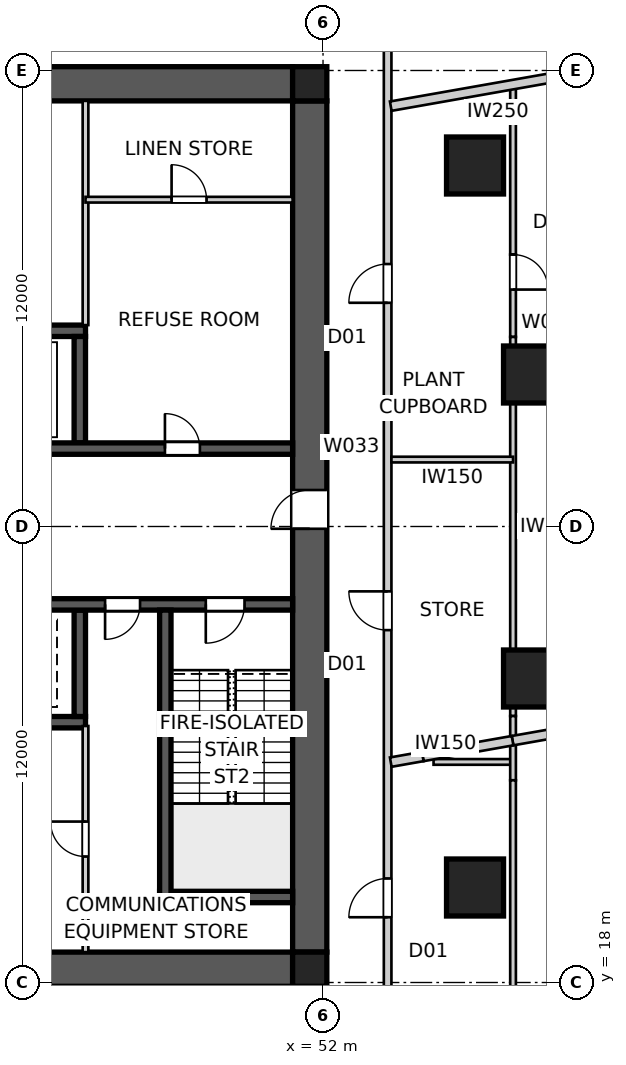
"""IFC4 building model, lengths in metres.
Left out: names, types, materials, properties, quantities, classifications, styles, units other than length and angle.
Written with IfcOpenShell. Run it as: python <this file> out.ifc"""

import sys

from ifc_helpers import new_model, si_unit, direction, frame, frame_2d, origin, origin_2d, place, context, subcontext, project, spatial, polyline, rectangle, outline, extrude, element, fill, save


model = new_model("IFC4")
c1 = context("Model", 3, precision=1e-05, world=origin(), true_north=direction((0.0, 1.0)))
c2 = subcontext(c1, "Body", "Model", "MODEL_VIEW")
j1 = project(units=[si_unit("LENGTHUNIT", "METRE"), si_unit("PLANEANGLEUNIT", "RADIAN")], contexts=[c1])
p1 = place(None, origin())
s1 = spatial("IfcSite", under=j1, at=p1, CompositionType="ELEMENT")
p2 = place(p1, origin())
s2 = spatial("IfcBuilding", under=s1, at=p2, CompositionType="ELEMENT")
p3 = place(p2, frame((0.0, 0.0, 74.4)))
s3 = spatial("IfcBuildingStorey", under=s2, at=p3, CompositionType="ELEMENT", Elevation=74.4)
for number, where, z_axis, x_axis in (
    (1, (28.8, 41.65, 0.0), (0.0, 0.0, 1.0), (1.0, 0.0, 0.0)),
    (2, (51.2, 18.35, 0.0), (0.0, 0.0, 1.0), (-1.0, 0.0, 0.0)),
):
    element("IfcWall", number, at=place(p3, frame(where, z_axis=z_axis, x_axis=x_axis)), inside=s3, PredefinedType="SHEAR", context=c2, shape_type="SweptSolid", body=[
        extrude(outline(polyline([(0.0, -0.45), (22.4, -0.45), (22.4, -0.025), (22.85, -0.025), (22.85, 0.025), (22.4, 0.025), (22.4, 0.45), (0.0, 0.45), (0.0, 0.025), (-0.45, 0.025), (-0.45, -0.025), (0.0, -0.025), (0.0, -0.45)])), origin(), (0.0, 0.0, 1.0), 5.0),
    ])
p4 = place(p3, frame((51.65, 18.8, 0.0), z_axis=(0.0, 0.0, 1.0), x_axis=(0.0, 1.0, 0.0)))
e3 = element("IfcWall", 3, at=p4, inside=s3, PredefinedType="SHEAR", context=c2, shape_type="SweptSolid", body=[
    extrude(outline(polyline([(0.0, -0.45), (22.4, -0.45), (22.4, -0.025), (22.85, -0.025), (22.85, 0.025), (22.4, 0.025), (22.4, 0.45), (0.0, 0.45), (0.0, 0.025), (-0.45, 0.025), (-0.45, -0.025), (0.0, -0.025), (0.0, -0.45)])), origin(), (0.0, 0.0, 1.0), 5.0),
])
p5 = place(p4, frame((11.14, 0.0, 0.0)))
e4 = element("IfcOpeningElement", 4, at=p5, cuts=e3, PredefinedType="OPENING", context=c2, shape_type="SweptSolid", body=[
    extrude(rectangle(XDim=1.02, YDim=2.4, at=frame_2d((0.51, 1.2))), frame((0.0, 0.46, 0.0), z_axis=(0.0, -1.0, 0.0), x_axis=(1.0, 0.0, 0.0)), (0.0, 0.0, 1.0), 0.92),
])
p6 = place(p3, frame((28.8, 32.05, 0.0), z_axis=(0.0, 0.0, 1.0), x_axis=(1.0, 0.0, 0.0)))
e5 = element("IfcWall", 5, at=p6, inside=s3, PredefinedType="SHEAR", context=c2, shape_type="SweptSolid", body=[
    extrude(rectangle(XDim=22.4, YDim=0.3, at=frame_2d((11.2, 0.0))), origin(), (0.0, 0.0, 1.0), 5.0),
])
p7 = place(p6, frame((19.04, 0.0, 0.0)))
e6 = element("IfcOpeningElement", 6, at=p7, cuts=e5, PredefinedType="OPENING", context=c2, shape_type="SweptSolid", body=[
    extrude(rectangle(XDim=0.92, YDim=2.1, at=frame_2d((0.46, 1.05))), frame((0.0, 0.16, 0.0), z_axis=(0.0, -1.0, 0.0), x_axis=(1.0, 0.0, 0.0)), (0.0, 0.0, 1.0), 0.32),
])
p8 = place(p6, frame((1.265, 0.0, 0.0)))
e7 = element("IfcOpeningElement", 7, at=p8, cuts=e5, PredefinedType="OPENING", context=c2, shape_type="SweptSolid", body=[
    extrude(rectangle(XDim=1.02, YDim=2.1, at=frame_2d((0.51, 1.05))), frame((0.0, 0.16, 0.0), z_axis=(0.0, -1.0, 0.0), x_axis=(1.0, 0.0, 0.0)), (0.0, 0.0, 1.0), 0.32),
])
p9 = place(p6, frame((4.015, 0.0, 0.0)))
e8 = element("IfcOpeningElement", 8, at=p9, cuts=e5, PredefinedType="OPENING", context=c2, shape_type="SweptSolid", body=[
    extrude(rectangle(XDim=0.92, YDim=2.1, at=frame_2d((0.46, 1.05))), frame((0.0, 0.16, 0.0), z_axis=(0.0, -1.0, 0.0), x_axis=(1.0, 0.0, 0.0)), (0.0, 0.0, 1.0), 0.32),
])
p10 = place(p6, frame((6.45, 0.0, 0.0)))
e9 = element("IfcOpeningElement", 9, at=p10, cuts=e5, PredefinedType="OPENING", context=c2, shape_type="SweptSolid", body=[
    extrude(rectangle(XDim=1.1, YDim=2.1, at=frame_2d((0.55, 1.05))), frame((0.0, 0.16, 0.0), z_axis=(0.0, -1.0, 0.0), x_axis=(1.0, 0.0, 0.0)), (0.0, 0.0, 1.0), 0.32),
])
p11 = place(p6, frame((9.25, 0.0, 0.0)))
e10 = element("IfcOpeningElement", 10, at=p11, cuts=e5, PredefinedType="OPENING", context=c2, shape_type="SweptSolid", body=[
    extrude(rectangle(XDim=1.1, YDim=2.1, at=frame_2d((0.55, 1.05))), frame((0.0, 0.16, 0.0), z_axis=(0.0, -1.0, 0.0), x_axis=(1.0, 0.0, 0.0)), (0.0, 0.0, 1.0), 0.32),
])
p12 = place(p6, frame((14.85, 0.0, 0.0)))
e11 = element("IfcOpeningElement", 11, at=p12, cuts=e5, PredefinedType="OPENING", context=c2, shape_type="SweptSolid", body=[
    extrude(rectangle(XDim=1.1, YDim=2.1, at=frame_2d((0.55, 1.05))), frame((0.0, 0.16, 0.0), z_axis=(0.0, -1.0, 0.0), x_axis=(1.0, 0.0, 0.0)), (0.0, 0.0, 1.0), 0.32),
])
p13 = place(p3, frame((51.2, 27.95, 0.0), z_axis=(0.0, 0.0, 1.0), x_axis=(-1.0, 0.0, 0.0)))
e12 = element("IfcWall", 12, at=p13, inside=s3, PredefinedType="SHEAR", context=c2, shape_type="SweptSolid", body=[
    extrude(rectangle(XDim=22.4, YDim=0.3, at=frame_2d((11.2, 0.0))), origin(), (0.0, 0.0, 1.0), 5.0),
])
p14 = place(p13, frame((19.04, 0.0, 0.0)))
e13 = element("IfcOpeningElement", 13, at=p14, cuts=e12, PredefinedType="OPENING", context=c2, shape_type="SweptSolid", body=[
    extrude(rectangle(XDim=0.92, YDim=2.1, at=frame_2d((0.46, 1.05))), frame((0.0, 0.16, 0.0), z_axis=(0.0, -1.0, 0.0), x_axis=(1.0, 0.0, 0.0)), (0.0, 0.0, 1.0), 0.32),
])
p15 = place(p13, frame((1.265, 0.0, 0.0)))
e14 = element("IfcOpeningElement", 14, at=p15, cuts=e12, PredefinedType="OPENING", context=c2, shape_type="SweptSolid", body=[
    extrude(rectangle(XDim=1.02, YDim=2.1, at=frame_2d((0.51, 1.05))), frame((0.0, 0.16, 0.0), z_axis=(0.0, -1.0, 0.0), x_axis=(1.0, 0.0, 0.0)), (0.0, 0.0, 1.0), 0.32),
])
p16 = place(p13, frame((4.015, 0.0, 0.0)))
e15 = element("IfcOpeningElement", 15, at=p16, cuts=e12, PredefinedType="OPENING", context=c2, shape_type="SweptSolid", body=[
    extrude(rectangle(XDim=0.92, YDim=2.1, at=frame_2d((0.46, 1.05))), frame((0.0, 0.16, 0.0), z_axis=(0.0, -1.0, 0.0), x_axis=(1.0, 0.0, 0.0)), (0.0, 0.0, 1.0), 0.32),
])
p17 = place(p13, frame((14.85, 0.0, 0.0)))
e16 = element("IfcOpeningElement", 16, at=p17, cuts=e12, PredefinedType="OPENING", context=c2, shape_type="SweptSolid", body=[
    extrude(rectangle(XDim=1.1, YDim=2.1, at=frame_2d((0.55, 1.05))), frame((0.0, 0.16, 0.0), z_axis=(0.0, -1.0, 0.0), x_axis=(1.0, 0.0, 0.0)), (0.0, 0.0, 1.0), 0.32),
])
for number, where, z_axis, x_axis in (
    (17, (34.25, 35.15, 0.0), (0.0, 0.0, 1.0), (1.0, 0.0, 0.0)),
    (18, (45.75, 24.85, 0.0), (0.0, 0.0, 1.0), (-1.0, 0.0, 0.0)),
):
    element("IfcWall", number, at=place(p3, frame(where, z_axis=z_axis, x_axis=x_axis)), inside=s3, PredefinedType="SHEAR", context=c2, shape_type="SweptSolid", body=[
        extrude(rectangle(XDim=11.5, YDim=0.3, at=frame_2d((5.75, 0.0))), origin(), (0.0, 0.0, 1.0), 5.0),
    ])
for number, where, z_axis, x_axis in (
    (19, (45.6, 27.8, 0.0), (0.0, 0.0, 1.0), (0.0, -1.0, 0.0)),
    (20, (45.6, 32.2, 0.0), (0.0, 0.0, 1.0), (0.0, 1.0, 0.0)),
):
    element("IfcWall", number, at=place(p3, frame(where, z_axis=z_axis, x_axis=x_axis)), inside=s3, PredefinedType="SHEAR", context=c2, shape_type="SweptSolid", body=[
        extrude(rectangle(XDim=2.8, YDim=0.3, at=frame_2d((1.4, 0.0))), origin(), (0.0, 0.0, 1.0), 5.0),
    ])
p18 = place(p3, frame((47.85, 27.8, 0.0), z_axis=(0.0, 0.0, 1.0), x_axis=(0.0, -1.0, 0.0)))
e21 = element("IfcWall", 21, at=p18, inside=s3, PredefinedType="SHEAR", context=c2, shape_type="SweptSolid", body=[
    extrude(rectangle(XDim=7.7, YDim=0.3, at=frame_2d((3.85, 0.0))), origin(), (0.0, 0.0, 1.0), 5.0),
])
p19 = place(p3, frame((51.2, 20.25, 0.0), z_axis=(0.0, 0.0, 1.0), x_axis=(-1.0, 0.0, 0.0)))
e22 = element("IfcWall", 22, at=p19, inside=s3, PredefinedType="SHEAR", context=c2, shape_type="SweptSolid", body=[
    extrude(rectangle(XDim=3.5, YDim=0.3, at=frame_2d((1.75, 0.0))), origin(), (0.0, 0.0, 1.0), 5.0),
])
for number, where, z_axis, x_axis in (
    (23, (51.65, 18.35, 0.0), (0.0, 0.0, 1.0), (1.0, 0.0, 0.0)),
    (24, (51.65, 41.65, 0.0), (0.0, 0.0, 1.0), (1.0, 0.0, 0.0)),
):
    element("IfcColumn", number, at=place(p3, frame(where, z_axis=z_axis, x_axis=x_axis)), inside=s3, PredefinedType="COLUMN", context=c2, shape_type="SweptSolid", body=[
        extrude(rectangle(XDim=0.9, YDim=0.9, at=origin_2d()), origin(), (0.0, 0.0, 1.0), 5.0),
    ])
for number, where, z_axis, x_axis in (
    (25, (57.5, 26.0, 0.0), (0.0, 0.0, 1.0), (1.0, 0.0, 0.0)),
    (26, (57.5, 34.0, 0.0), (0.0, 0.0, 1.0), (1.0, 0.0, 0.0)),
    (27, (56.0, 39.5, 0.0), (0.0, 0.0, 1.0), (1.0, 0.0, 0.0)),
    (28, (56.0, 20.5, 0.0), (0.0, 0.0, 1.0), (1.0, 0.0, 0.0)),
):
    element("IfcColumn", number, at=place(p3, frame(where, z_axis=z_axis, x_axis=x_axis)), inside=s3, PredefinedType="COLUMN", context=c2, shape_type="SweptSolid", body=[
        extrude(rectangle(XDim=1.5, YDim=1.5, at=origin_2d()), origin(), (0.0, 0.0, 1.0), 5.0),
    ])
p20 = place(p3, frame((53.7, 16.3, 0.0), z_axis=(0.0, 0.0, 1.0), x_axis=(0.0, 1.0, 0.0)))
e29 = element("IfcWall", 29, at=p20, inside=s3, PredefinedType="PARTITIONING", context=c2, shape_type="SweptSolid", body=[
    extrude(rectangle(XDim=27.4, YDim=0.2, at=frame_2d((13.7, 0.0))), origin(), (0.0, 0.0, 1.0), 4.85),
])
p21 = place(p20, frame((19.587, 0.0, 0.0)))
e30 = element("IfcOpeningElement", 30, at=p21, cuts=e29, PredefinedType="OPENING", context=c2, shape_type="SweptSolid", body=[
    extrude(rectangle(XDim=1.02, YDim=2.34, at=frame_2d((0.51, 1.17))), frame((0.0, 0.11, 0.0), z_axis=(0.0, -1.0, 0.0), x_axis=(1.0, 0.0, 0.0)), (0.0, 0.0, 1.0), 0.22),
])
p22 = place(p20, frame((10.973, 0.0, 0.0)))
e31 = element("IfcOpeningElement", 31, at=p22, cuts=e29, PredefinedType="OPENING", context=c2, shape_type="SweptSolid", body=[
    extrude(rectangle(XDim=1.02, YDim=2.34, at=frame_2d((0.51, 1.17))), frame((0.0, 0.11, 0.0), z_axis=(0.0, -1.0, 0.0), x_axis=(1.0, 0.0, 0.0)), (0.0, 0.0, 1.0), 0.22),
])
p23 = place(p20, frame((3.417, 0.0, 0.0)))
e32 = element("IfcOpeningElement", 32, at=p23, cuts=e29, PredefinedType="OPENING", context=c2, shape_type="SweptSolid", body=[
    extrude(rectangle(XDim=1.02, YDim=2.34, at=frame_2d((0.51, 1.17))), frame((0.0, 0.11, 0.0), z_axis=(0.0, -1.0, 0.0), x_axis=(1.0, 0.0, 0.0)), (0.0, 0.0, 1.0), 0.22),
])
p24 = place(p3, frame((62.157, 25.276, 0.0), z_axis=(0.0, 0.0, 1.0), x_axis=(-0.984813509266, -0.173615529166, 0.0)))
e33 = element("IfcWall", 33, at=p24, inside=s3, PredefinedType="PARTITIONING", context=c2, shape_type="SweptSolid", body=[
    extrude(rectangle(XDim=5.25, YDim=0.25, at=frame_2d((2.625, 0.0))), origin(), (0.0, 0.0, 1.0), 4.85),
])
p25 = place(p3, frame((56.987, 24.364, 0.0), z_axis=(0.0, 0.0, 1.0), x_axis=(-0.984811193906, -0.17362866226, 0.0)))
e34 = element("IfcWall", 34, at=p25, inside=s3, PredefinedType="PARTITIONING", context=c2, shape_type="SweptSolid", body=[
    extrude(rectangle(XDim=2.4, YDim=0.25, at=frame_2d((1.2, 0.0))), origin(), (0.0, 0.0, 1.0), 4.322),
])
p26 = place(p3, frame((54.624, 23.948, 0.0), z_axis=(0.0, 0.0, 1.0), x_axis=(-0.984789312188, -0.173752728326, 0.0)))
e35 = element("IfcWall", 35, at=p26, inside=s3, PredefinedType="PARTITIONING", context=c2, shape_type="SweptSolid", body=[
    extrude(rectangle(XDim=0.854, YDim=0.25, at=frame_2d((0.427, 0.0))), origin(), (0.0, 0.0, 1.0), 4.85),
])
p27 = place(p3, frame((59.205, 42.018, 0.0), z_axis=(0.0, 0.0, 1.0), x_axis=(-0.984803192417, -0.173674040102, 0.0)))
e36 = element("IfcWall", 36, at=p27, inside=s3, PredefinedType="PARTITIONING", context=c2, shape_type="SweptSolid", body=[
    extrude(rectangle(XDim=5.506, YDim=0.25, at=frame_2d((2.753, 0.0))), origin(), (0.0, 0.0, 1.0), 4.85),
])
p28 = place(p3, frame((45.75, 41.2, 0.0), z_axis=(0.0, 0.0, 1.0), x_axis=(0.0, -1.0, 0.0)))
e37 = element("IfcWall", 37, at=p28, inside=s3, PredefinedType="SOLIDWALL", context=c2, shape_type="SweptSolid", body=[
    extrude(rectangle(XDim=5.9, YDim=0.15, at=frame_2d((2.95, 0.0))), origin(), (0.0, 0.0, 1.0), 4.85),
])
p29 = place(p3, frame((45.75, 38.6, 0.0), z_axis=(0.0, 0.0, 1.0), x_axis=(1.0, 0.0, 0.0)))
e38 = element("IfcWall", 38, at=p29, inside=s3, PredefinedType="SOLIDWALL", context=c2, shape_type="SweptSolid", body=[
    extrude(rectangle(XDim=5.45, YDim=0.15, at=frame_2d((2.725, 0.0))), origin(), (0.0, 0.0, 1.0), 4.85),
])
p30 = place(p29, frame((2.265, 0.0, 0.0)))
e39 = element("IfcOpeningElement", 39, at=p30, cuts=e38, PredefinedType="OPENING", context=c2, shape_type="SweptSolid", body=[
    extrude(rectangle(XDim=0.92, YDim=2.1, at=frame_2d((0.46, 1.05))), frame((0.0, 0.085, 0.0), z_axis=(0.0, -1.0, 0.0), x_axis=(1.0, 0.0, 0.0)), (0.0, 0.0, 1.0), 0.17),
])
p31 = place(p3, frame((45.75, 18.8, 0.0), z_axis=(0.0, 0.0, 1.0), x_axis=(0.0, 1.0, 0.0)))
e40 = element("IfcWall", 40, at=p31, inside=s3, PredefinedType="SOLIDWALL", context=c2, shape_type="SweptSolid", body=[
    extrude(rectangle(XDim=5.95, YDim=0.15, at=frame_2d((2.975, 0.0))), origin(), (0.0, 0.0, 1.0), 4.85),
])
p32 = place(p31, frame((2.515, 0.0, 0.0)))
e41 = element("IfcOpeningElement", 41, at=p32, cuts=e40, PredefinedType="OPENING", context=c2, shape_type="SweptSolid", body=[
    extrude(rectangle(XDim=0.92, YDim=2.1, at=frame_2d((0.46, 1.05))), frame((0.0, 0.085, 0.0), z_axis=(0.0, -1.0, 0.0), x_axis=(1.0, 0.0, 0.0)), (0.0, 0.0, 1.0), 0.17),
])
p33 = place(p3, frame((54.908, 23.805, 0.0), z_axis=(0.0, 0.0, 1.0), x_axis=(1.0, 0.0, 0.0)))
e42 = element("IfcWall", 42, at=p33, inside=s3, PredefinedType="SOLIDWALL", context=c2, shape_type="SweptSolid", body=[
    extrude(rectangle(XDim=2.092, YDim=0.15, at=frame_2d((1.046, 0.0))), origin(), (0.0, 0.0, 1.0), 4.85),
])
p34 = place(p3, frame((57.0, 41.629, 0.0), z_axis=(0.0, 0.0, 1.0), x_axis=(0.0, -1.0, 0.0)))
e43 = element("IfcWall", 43, at=p34, inside=s3, PredefinedType="SOLIDWALL", context=c2, shape_type="SweptSolid", body=[
    extrude(rectangle(XDim=4.474, YDim=0.15, at=frame_2d((2.237, 0.0))), origin(), (0.0, 0.0, 1.0), 4.85),
])
p35 = place(p3, frame((57.0, 37.155, 0.0), z_axis=(0.0, 0.0, 1.0), x_axis=(0.0, -1.0, 0.0)))
e44 = element("IfcWall", 44, at=p35, inside=s3, PredefinedType="SOLIDWALL", context=c2, shape_type="SweptSolid", body=[
    extrude(rectangle(XDim=2.167, YDim=0.15, at=frame_2d((1.083, 0.0))), origin(), (0.0, 0.0, 1.0), 3.85),
])
p36 = place(p35, origin())
e45 = element("IfcOpeningElement", 45, at=p36, cuts=e44, PredefinedType="OPENING", context=c2, shape_type="SweptSolid", body=[
    extrude(rectangle(XDim=0.92, YDim=2.1, at=frame_2d((0.46, 1.05))), frame((0.0, 0.085, 0.0), z_axis=(0.0, -1.0, 0.0), x_axis=(1.0, 0.0, 0.0)), (0.0, 0.0, 1.0), 0.17),
])
p37 = place(p3, frame((57.0, 34.988, 0.0), z_axis=(0.0, 0.0, 1.0), x_axis=(0.0, -1.0, 0.0)))
e46 = element("IfcWall", 46, at=p37, inside=s3, PredefinedType="SOLIDWALL", context=c2, shape_type="SweptSolid", body=[
    extrude(rectangle(XDim=9.977, YDim=0.15, at=frame_2d((4.988, 0.0))), origin(), (0.0, 0.0, 1.0), 4.85),
])
p38 = place(p3, frame((57.0, 25.012, 0.0), z_axis=(0.0, 0.0, 1.0), x_axis=(0.0, -1.0, 0.0)))
e47 = element("IfcWall", 47, at=p38, inside=s3, PredefinedType="SOLIDWALL", context=c2, shape_type="SweptSolid", body=[
    extrude(rectangle(XDim=1.69, YDim=0.15, at=frame_2d((0.845, 0.0))), origin(), (0.0, 0.0, 1.0), 3.85),
])
p39 = place(p3, frame((57.0, 23.322, 0.0), z_axis=(0.0, 0.0, 1.0), x_axis=(0.0, -1.0, 0.0)))
e48 = element("IfcWall", 48, at=p39, inside=s3, PredefinedType="SOLIDWALL", context=c2, shape_type="SweptSolid", body=[
    extrude(rectangle(XDim=7.821, YDim=0.15, at=frame_2d((3.911, 0.0))), origin(), (0.0, 0.0, 1.0), 4.85),
])
p40 = place(p3, frame((57.0, 31.761, 0.0), z_axis=(0.0, 0.0, 1.0), x_axis=(-1.0, 0.0, 0.0)))
e49 = element("IfcWall", 49, at=p40, inside=s3, PredefinedType="SOLIDWALL", context=c2, shape_type="SweptSolid", body=[
    extrude(rectangle(XDim=3.2, YDim=0.15, at=frame_2d((1.6, 0.0))), origin(), (0.0, 0.0, 1.0), 4.85),
])
p41 = place(p7, origin())
e50 = element("IfcDoor", 50, at=p41, inside=s3, OperationType="SINGLE_SWING_LEFT", PredefinedType="DOOR", context=c2, shape_type="SweptSolid", body=[
    extrude(rectangle(XDim=0.92, YDim=2.1, at=frame_2d((0.46, 1.05))), frame((0.0, 0.025, 0.0), z_axis=(0.0, -1.0, 0.0), x_axis=(1.0, 0.0, 0.0)), (0.0, 0.0, 1.0), 0.05),
])
fill(e6, e50)
p42 = place(p15, origin())
e51 = element("IfcDoor", 51, at=p42, inside=s3, OperationType="SINGLE_SWING_RIGHT", PredefinedType="DOOR", context=c2, shape_type="SweptSolid", body=[
    extrude(rectangle(XDim=1.02, YDim=2.1, at=frame_2d((0.51, 1.05))), frame((0.0, 0.025, 0.0), z_axis=(0.0, -1.0, 0.0), x_axis=(1.0, 0.0, 0.0)), (0.0, 0.0, 1.0), 0.05),
])
fill(e14, e51)
p43 = place(p16, origin())
e52 = element("IfcDoor", 52, at=p43, inside=s3, OperationType="SINGLE_SWING_RIGHT", PredefinedType="DOOR", context=c2, shape_type="SweptSolid", body=[
    extrude(rectangle(XDim=0.92, YDim=2.1, at=frame_2d((0.46, 1.05))), frame((0.0, 0.025, 0.0), z_axis=(0.0, -1.0, 0.0), x_axis=(1.0, 0.0, 0.0)), (0.0, 0.0, 1.0), 0.05),
])
fill(e15, e52)
p44 = place(p21, origin())
e53 = element("IfcDoor", 53, at=p44, inside=s3, OperationType="SINGLE_SWING_LEFT", PredefinedType="DOOR", context=c2, shape_type="SweptSolid", body=[
    extrude(rectangle(XDim=1.02, YDim=2.34, at=frame_2d((0.51, 1.17))), frame((0.0, 0.025, 0.0), z_axis=(0.0, -1.0, 0.0), x_axis=(1.0, 0.0, 0.0)), (0.0, 0.0, 1.0), 0.05),
])
fill(e30, e53)
p45 = place(p22, origin())
e54 = element("IfcDoor", 54, at=p45, inside=s3, OperationType="SINGLE_SWING_RIGHT", PredefinedType="DOOR", context=c2, shape_type="SweptSolid", body=[
    extrude(rectangle(XDim=1.02, YDim=2.34, at=frame_2d((0.51, 1.17))), frame((0.0, 0.025, 0.0), z_axis=(0.0, -1.0, 0.0), x_axis=(1.0, 0.0, 0.0)), (0.0, 0.0, 1.0), 0.05),
])
fill(e31, e54)
p46 = place(p23, origin())
e55 = element("IfcDoor", 55, at=p46, inside=s3, OperationType="SINGLE_SWING_LEFT", PredefinedType="DOOR", context=c2, shape_type="SweptSolid", body=[
    extrude(rectangle(XDim=1.02, YDim=2.34, at=frame_2d((0.51, 1.17))), frame((0.0, 0.025, 0.0), z_axis=(0.0, -1.0, 0.0), x_axis=(1.0, 0.0, 0.0)), (0.0, 0.0, 1.0), 0.05),
])
fill(e32, e55)
p47 = place(p30, origin())
e56 = element("IfcDoor", 56, at=p47, inside=s3, OperationType="SINGLE_SWING_LEFT", PredefinedType="DOOR", context=c2, shape_type="SweptSolid", body=[
    extrude(rectangle(XDim=0.92, YDim=2.1, at=frame_2d((0.46, 1.05))), frame((0.0, 0.025, 0.0), z_axis=(0.0, -1.0, 0.0), x_axis=(1.0, 0.0, 0.0)), (0.0, 0.0, 1.0), 0.05),
])
fill(e39, e56)
p48 = place(p32, origin())
e57 = element("IfcDoor", 57, at=p48, inside=s3, OperationType="SINGLE_SWING_RIGHT", PredefinedType="DOOR", context=c2, shape_type="SweptSolid", body=[
    extrude(rectangle(XDim=0.92, YDim=2.1, at=frame_2d((0.46, 1.05))), frame((0.0, 0.025, 0.0), z_axis=(0.0, -1.0, 0.0), x_axis=(1.0, 0.0, 0.0)), (0.0, 0.0, 1.0), 0.05),
])
fill(e41, e57)
p49 = place(p36, origin())
e58 = element("IfcDoor", 58, at=p49, inside=s3, OperationType="SINGLE_SWING_RIGHT", PredefinedType="DOOR", context=c2, shape_type="SweptSolid", body=[
    extrude(rectangle(XDim=0.92, YDim=2.1, at=frame_2d((0.46, 1.05))), frame((0.0, 0.025, 0.0), z_axis=(0.0, -1.0, 0.0), x_axis=(1.0, 0.0, 0.0)), (0.0, 0.0, 1.0), 0.05),
])
fill(e45, e58)
p50 = place(p5, origin())
e59 = element("IfcDoor", 59, at=p50, inside=s3, OperationType="SINGLE_SWING_LEFT", PredefinedType="DOOR", context=c2, shape_type="SweptSolid", body=[
    extrude(rectangle(XDim=1.02, YDim=2.4, at=frame_2d((0.51, 1.2))), frame((0.0, 0.025, 0.0), z_axis=(0.0, -1.0, 0.0), x_axis=(1.0, 0.0, 0.0)), (0.0, 0.0, 1.0), 0.05),
])
fill(e4, e59)
save(model, sys.argv[1])
